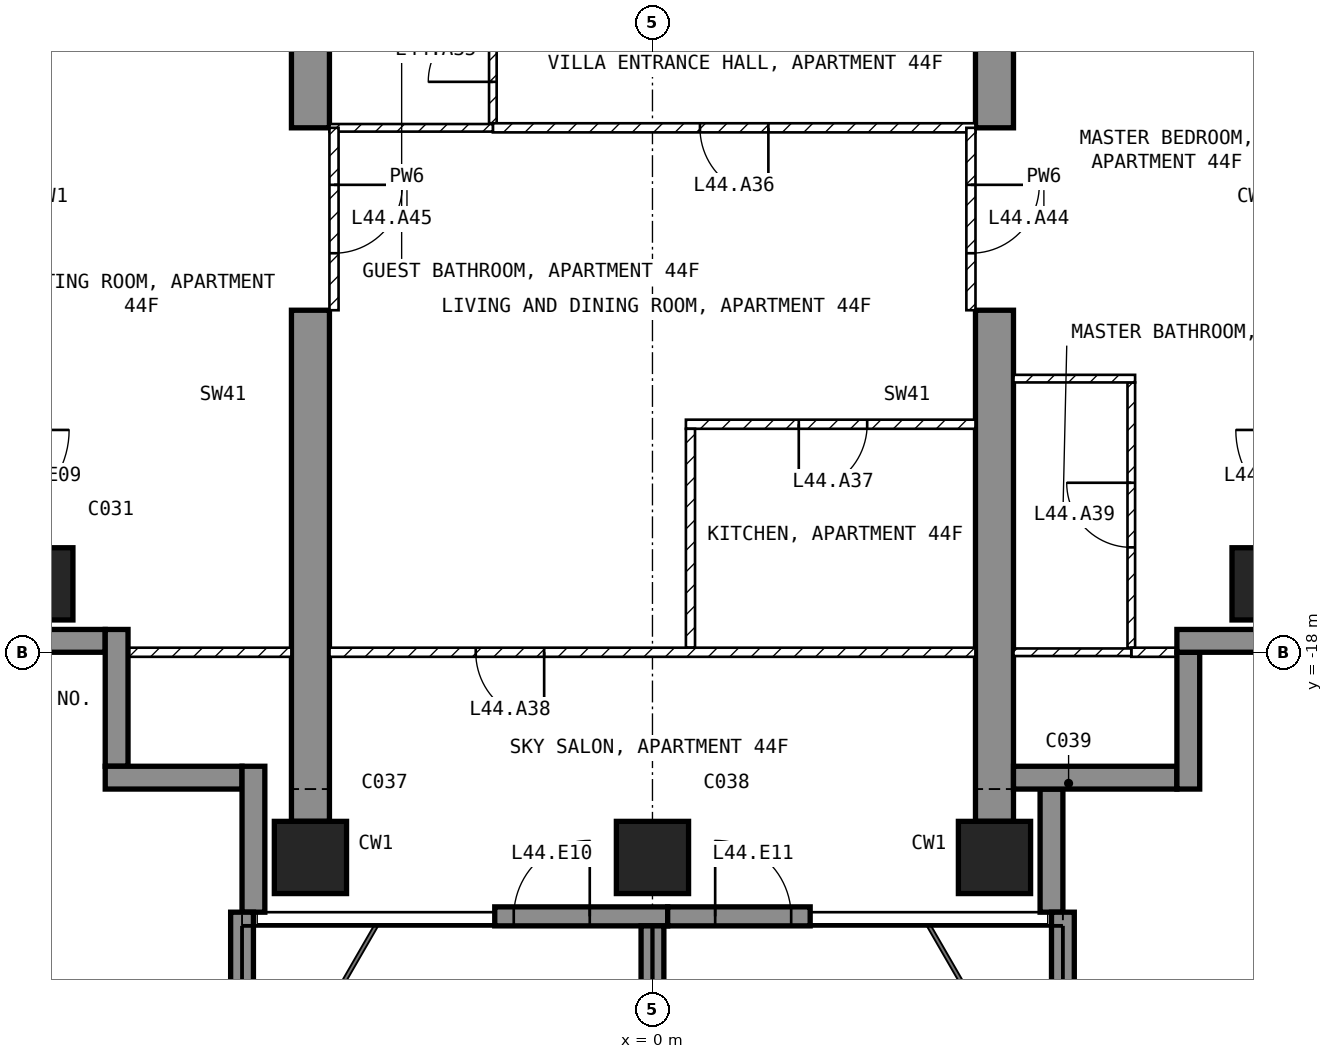
"""IFC4 building model, lengths in metres.
Left out: names, types, materials, properties, quantities, classifications, styles, units other than length and angle.
Written with IfcOpenShell. Run it as: python <this file> out.ifc"""

import sys

from ifc_helpers import new_model, si_unit, direction, frame, frame_2d, origin, origin_2d, place, context, subcontext, project, spatial, polyline, rectangle, outline, extrude, element, fill, save


model = new_model("IFC4")
c1 = context("Model", 3, precision=1e-05, world=origin(), true_north=direction((0.0, 1.0)))
c2 = subcontext(c1, "Body", "Model", "MODEL_VIEW")
j1 = project(units=[si_unit("LENGTHUNIT", "METRE"), si_unit("PLANEANGLEUNIT", "RADIAN")], contexts=[c1])
p1 = place(None, origin())
s1 = spatial("IfcSite", under=j1, at=p1, CompositionType="ELEMENT")
p2 = place(p1, origin())
s2 = spatial("IfcBuilding", under=s1, at=p2, CompositionType="ELEMENT")
p3 = place(p2, frame((0.0, 0.0, 180.6)))
s3 = spatial("IfcBuildingStorey", under=s2, at=p3, CompositionType="ELEMENT", Elevation=180.6)
for number, where, z_axis, x_axis in (
    (1, (-8.1, -17.1, -0.25), (0.0, 0.0, 1.0), (1.0, 0.0, 0.0)),
    (2, (-4.5, -20.7, -0.25), (0.0, 0.0, 1.0), (1.0, 0.0, 0.0)),
    (3, (0.0, -20.7, -0.25), (0.0, 0.0, 1.0), (1.0, 0.0, 0.0)),
    (4, (4.5, -20.7, -0.25), (0.0, 0.0, 1.0), (1.0, 0.0, 0.0)),
    (5, (8.1, -17.1, -0.25), (0.0, 0.0, 1.0), (1.0, 0.0, 0.0)),
):
    element("IfcColumn", number, at=place(p3, frame(where, z_axis=z_axis, x_axis=x_axis)), inside=s3, PredefinedType="COLUMN", context=c2, shape_type="SweptSolid", body=[
        extrude(rectangle(XDim=0.95, YDim=0.95, at=origin_2d()), origin(), (0.0, 0.0, 1.0), 3.5),
    ])
for number, where, z_axis, x_axis in (
    (6, (-4.75, -20.225, -0.25), (1.0, 0.0, 0.0), (0.0, 1.0, 0.0)),
    (7, (4.25, -20.225, -0.25), (1.0, 0.0, 0.0), (0.0, 1.0, 0.0)),
):
    element("IfcWall", number, at=place(p3, frame(where, z_axis=z_axis, x_axis=x_axis)), inside=s3, PredefinedType="SHEAR", context=c2, shape_type="SweptSolid", body=[
        extrude(outline(polyline([(0.0, 0.0), (6.725, 0.0), (6.725, 2.65), (9.125, 2.65), (9.125, 0.0), (11.225, 0.0), (11.225, 3.5), (0.0, 3.5), (0.0, 0.0)])), origin(), (0.0, 0.0, 1.0), 0.5),
    ])
p4 = place(p3, frame((-2.075, -21.475, 0.0), z_axis=(0.0, 0.0, 1.0), x_axis=(1.0, 0.0, 0.0)))
e8 = element("IfcWall", 8, at=p4, inside=s3, PredefinedType="SOLIDWALL", context=c2, shape_type="SweptSolid", body=[
    extrude(rectangle(XDim=2.275, YDim=0.25, at=frame_2d((1.137, 0.0))), origin(), (0.0, 0.0, 1.0), 3.25),
])
p5 = place(p4, frame((0.25, 0.0, 0.0)))
e9 = element("IfcOpeningElement", 9, at=p5, cuts=e8, PredefinedType="OPENING", context=c2, shape_type="SweptSolid", body=[
    extrude(rectangle(XDim=1.0, YDim=2.4, at=frame_2d((0.5, 1.2))), frame((0.0, 0.135, 0.0), z_axis=(0.0, -1.0, 0.0), x_axis=(1.0, 0.0, 0.0)), (0.0, 0.0, 1.0), 0.27),
])
p6 = place(p3, frame((0.2, -21.475, 0.0), z_axis=(0.0, 0.0, 1.0), x_axis=(1.0, 0.0, 0.0)))
e10 = element("IfcWall", 10, at=p6, inside=s3, PredefinedType="SOLIDWALL", context=c2, shape_type="SweptSolid", body=[
    extrude(rectangle(XDim=1.875, YDim=0.25, at=frame_2d((0.938, 0.0))), origin(), (0.0, 0.0, 1.0), 3.25),
])
p7 = place(p6, frame((0.625, 0.0, 0.0)))
e11 = element("IfcOpeningElement", 11, at=p7, cuts=e10, PredefinedType="OPENING", context=c2, shape_type="SweptSolid", body=[
    extrude(rectangle(XDim=1.0, YDim=2.4, at=frame_2d((0.5, 1.2))), frame((0.0, 0.135, 0.0), z_axis=(0.0, -1.0, 0.0), x_axis=(1.0, 0.0, 0.0)), (0.0, 0.0, 1.0), 0.27),
])
p8 = place(p3, frame((5.25, -21.42, 0.0), z_axis=(0.0, 0.0, 1.0), x_axis=(0.0, 1.0, 0.0)))
e12 = element("IfcWall", 12, at=p8, inside=s3, PredefinedType="SOLIDWALL", context=c2, shape_type="SweptSolid", body=[
    extrude(rectangle(XDim=1.62, YDim=0.3, at=frame_2d((0.81, 0.0))), origin(), (0.0, 0.0, 1.0), 3.25),
])
p9 = place(p3, frame((4.75, -19.65, 0.0), z_axis=(0.0, 0.0, 1.0), x_axis=(1.0, 0.0, 0.0)))
e13 = element("IfcWall", 13, at=p9, inside=s3, PredefinedType="SOLIDWALL", context=c2, shape_type="SweptSolid", body=[
    extrude(rectangle(XDim=2.15, YDim=0.3, at=frame_2d((1.075, 0.0))), origin(), (0.0, 0.0, 1.0), 3.25),
])
p10 = place(p3, frame((7.05, -19.8, 0.0), z_axis=(0.0, 0.0, 1.0), x_axis=(0.0, 1.0, 0.0)))
e14 = element("IfcWall", 14, at=p10, inside=s3, PredefinedType="SOLIDWALL", context=c2, shape_type="SweptSolid", body=[
    extrude(rectangle(XDim=1.8, YDim=0.3, at=frame_2d((0.9, 0.0))), origin(), (0.0, 0.0, 1.0), 3.25),
])
p11 = place(p3, frame((6.9, -17.85, 0.0), z_axis=(0.0, 0.0, 1.0), x_axis=(1.0, 0.0, 0.0)))
e15 = element("IfcWall", 15, at=p11, inside=s3, PredefinedType="SOLIDWALL", context=c2, shape_type="SweptSolid", body=[
    extrude(rectangle(XDim=1.85, YDim=0.3, at=frame_2d((0.925, 0.0))), origin(), (0.0, 0.0, 1.0), 3.25),
])
p12 = place(p3, frame((-8.75, -17.85, 0.0), z_axis=(0.0, 0.0, 1.0), x_axis=(1.0, 0.0, 0.0)))
e16 = element("IfcWall", 16, at=p12, inside=s3, PredefinedType="SOLIDWALL", context=c2, shape_type="SweptSolid", body=[
    extrude(rectangle(XDim=1.55, YDim=0.3, at=frame_2d((0.775, 0.0))), origin(), (0.0, 0.0, 1.0), 3.25),
])
for number, where, z_axis, x_axis in (
    (17, (-7.05, -17.7, 0.0), (0.0, 0.0, 1.0), (0.0, -1.0, 0.0)),
    (18, (-7.2, -19.65, 0.0), (0.0, 0.0, 1.0), (1.0, 0.0, 0.0)),
):
    element("IfcWall", number, at=place(p3, frame(where, z_axis=z_axis, x_axis=x_axis)), inside=s3, PredefinedType="SOLIDWALL", context=c2, shape_type="SweptSolid", body=[
        extrude(rectangle(XDim=1.8, YDim=0.3, at=frame_2d((0.9, 0.0))), origin(), (0.0, 0.0, 1.0), 3.25),
    ])
p13 = place(p3, frame((-5.25, -19.5, 0.0), z_axis=(0.0, 0.0, 1.0), x_axis=(0.0, -1.0, 0.0)))
e19 = element("IfcWall", 19, at=p13, inside=s3, PredefinedType="SOLIDWALL", context=c2, shape_type="SweptSolid", body=[
    extrude(rectangle(XDim=1.92, YDim=0.3, at=frame_2d((0.96, 0.0))), origin(), (0.0, 0.0, 1.0), 3.25),
])
p14 = place(p3, frame((-5.4, -21.42, 0.0), z_axis=(0.0, 0.0, 1.0), x_axis=(0.0, -1.0, 0.0)))
e20 = element("IfcWall", 20, at=p14, inside=s3, PredefinedType="SOLIDWALL", context=c2, shape_type="SweptSolid", body=[
    extrude(rectangle(XDim=2.88, YDim=0.3, at=frame_2d((1.44, 0.0))), origin(), (0.0, 0.0, 1.0), 3.25),
])
p15 = place(p3, frame((0.0, -21.6, 0.0), z_axis=(0.0, 0.0, 1.0), x_axis=(0.0, -1.0, 0.0)))
e21 = element("IfcWall", 21, at=p15, inside=s3, PredefinedType="SOLIDWALL", context=c2, shape_type="SweptSolid", body=[
    extrude(rectangle(XDim=2.7, YDim=0.3, at=frame_2d((1.35, 0.0))), origin(), (0.0, 0.0, 1.0), 3.25),
])
p16 = place(p3, frame((5.4, -21.42, 0.0), z_axis=(0.0, 0.0, 1.0), x_axis=(0.0, -1.0, 0.0)))
e22 = element("IfcWall", 22, at=p16, inside=s3, PredefinedType="SOLIDWALL", context=c2, shape_type="SweptSolid", body=[
    extrude(rectangle(XDim=2.88, YDim=0.3, at=frame_2d((1.44, 0.0))), origin(), (0.0, 0.0, 1.0), 3.25),
])
p17 = place(p3, frame((-2.1, -11.04, 0.0), z_axis=(0.0, 0.0, 1.0), x_axis=(0.0, 1.0, 0.0)))
e23 = element("IfcWall", 23, at=p17, inside=s3, PredefinedType="PARTITIONING", context=c2, shape_type="SweptSolid", body=[
    extrude(rectangle(XDim=1.94, YDim=0.1, at=frame_2d((0.97, 0.0))), origin(), (0.0, 0.0, 1.0), 3.25),
])
p18 = place(p17, frame((0.545, 0.0, 0.0)))
e24 = element("IfcOpeningElement", 24, at=p18, cuts=e23, PredefinedType="OPENING", context=c2, shape_type="SweptSolid", body=[
    extrude(rectangle(XDim=0.85, YDim=2.1, at=frame_2d((0.425, 1.05))), frame((0.0, 0.06, 0.0), z_axis=(0.0, -1.0, 0.0), x_axis=(1.0, 0.0, 0.0)), (0.0, 0.0, 1.0), 0.12),
])
p19 = place(p3, frame((4.25, -11.1, 0.0), z_axis=(0.0, 0.0, 1.0), x_axis=(-1.0, 0.0, 0.0)))
e25 = element("IfcWall", 25, at=p19, inside=s3, PredefinedType="PARTITIONING", context=c2, shape_type="SweptSolid", body=[
    extrude(rectangle(XDim=6.35, YDim=0.12, at=frame_2d((3.175, 0.0))), origin(), (0.0, 0.0, 1.0), 3.25),
])
p20 = place(p19, frame((2.725, 0.0, 0.0)))
e26 = element("IfcOpeningElement", 26, at=p20, cuts=e25, PredefinedType="OPENING", context=c2, shape_type="SweptSolid", body=[
    extrude(rectangle(XDim=0.9, YDim=2.1, at=frame_2d((0.45, 1.05))), frame((0.0, 0.07, 0.0), z_axis=(0.0, -1.0, 0.0), x_axis=(1.0, 0.0, 0.0)), (0.0, 0.0, 1.0), 0.14),
])
p21 = place(p3, frame((-2.1, -11.1, 0.0), z_axis=(0.0, 0.0, 1.0), x_axis=(-1.0, 0.0, 0.0)))
e27 = element("IfcWall", 27, at=p21, inside=s3, PredefinedType="PARTITIONING", context=c2, shape_type="SweptSolid", body=[
    extrude(rectangle(XDim=2.15, YDim=0.1, at=frame_2d((1.075, 0.0))), origin(), (0.0, 0.0, 1.0), 3.25),
])
p22 = place(p3, frame((4.25, -15.0, 0.0), z_axis=(0.0, 0.0, 1.0), x_axis=(-1.0, 0.0, 0.0)))
e28 = element("IfcWall", 28, at=p22, inside=s3, PredefinedType="PARTITIONING", context=c2, shape_type="SweptSolid", body=[
    extrude(rectangle(XDim=3.81, YDim=0.12, at=frame_2d((1.905, 0.0))), origin(), (0.0, 0.0, 1.0), 3.25),
])
p23 = place(p22, frame((1.425, 0.0, 0.0)))
e29 = element("IfcOpeningElement", 29, at=p23, cuts=e28, PredefinedType="OPENING", context=c2, shape_type="SweptSolid", body=[
    extrude(rectangle(XDim=0.9, YDim=2.1, at=frame_2d((0.45, 1.05))), frame((0.0, 0.07, 0.0), z_axis=(0.0, -1.0, 0.0), x_axis=(1.0, 0.0, 0.0)), (0.0, 0.0, 1.0), 0.14),
])
p24 = place(p3, frame((0.5, -15.06, 0.0), z_axis=(0.0, 0.0, 1.0), x_axis=(0.0, -1.0, 0.0)))
e30 = element("IfcWall", 30, at=p24, inside=s3, PredefinedType="PARTITIONING", context=c2, shape_type="SweptSolid", body=[
    extrude(rectangle(XDim=2.88, YDim=0.12, at=frame_2d((1.44, 0.0))), origin(), (0.0, 0.0, 1.0), 3.25),
])
p25 = place(p3, frame((4.25, -18.0, 0.0), z_axis=(0.0, 0.0, 1.0), x_axis=(-1.0, 0.0, 0.0)))
e31 = element("IfcWall", 31, at=p25, inside=s3, PredefinedType="PARTITIONING", context=c2, shape_type="SweptSolid", body=[
    extrude(rectangle(XDim=8.5, YDim=0.12, at=frame_2d((4.25, 0.0))), origin(), (0.0, 0.0, 1.0), 3.25),
])
p26 = place(p25, frame((5.675, 0.0, 0.0)))
e32 = element("IfcOpeningElement", 32, at=p26, cuts=e31, PredefinedType="OPENING", context=c2, shape_type="SweptSolid", body=[
    extrude(rectangle(XDim=0.9, YDim=2.1, at=frame_2d((0.45, 1.05))), frame((0.0, 0.07, 0.0), z_axis=(0.0, -1.0, 0.0), x_axis=(1.0, 0.0, 0.0)), (0.0, 0.0, 1.0), 0.14),
])
p27 = place(p3, frame((6.3, -17.94, 0.0), z_axis=(0.0, 0.0, 1.0), x_axis=(0.0, 1.0, 0.0)))
e33 = element("IfcWall", 33, at=p27, inside=s3, PredefinedType="PARTITIONING", context=c2, shape_type="SweptSolid", body=[
    extrude(rectangle(XDim=3.49, YDim=0.1, at=frame_2d((1.745, 0.0))), origin(), (0.0, 0.0, 1.0), 3.25),
])
p28 = place(p27, frame((1.32, 0.0, 0.0)))
e34 = element("IfcOpeningElement", 34, at=p28, cuts=e33, PredefinedType="OPENING", context=c2, shape_type="SweptSolid", body=[
    extrude(rectangle(XDim=0.85, YDim=2.1, at=frame_2d((0.425, 1.05))), frame((0.0, 0.06, 0.0), z_axis=(0.0, -1.0, 0.0), x_axis=(1.0, 0.0, 0.0)), (0.0, 0.0, 1.0), 0.12),
])
p29 = place(p3, frame((6.35, -14.4, 0.0), z_axis=(0.0, 0.0, 1.0), x_axis=(-1.0, 0.0, 0.0)))
e35 = element("IfcWall", 35, at=p29, inside=s3, PredefinedType="PARTITIONING", context=c2, shape_type="SweptSolid", body=[
    extrude(rectangle(XDim=1.6, YDim=0.1, at=frame_2d((0.8, 0.0))), origin(), (0.0, 0.0, 1.0), 3.25),
])
p30 = place(p3, frame((7.12, -18.0, 0.0), z_axis=(0.0, 0.0, 1.0), x_axis=(-1.0, 0.0, 0.0)))
e36 = element("IfcWall", 36, at=p30, inside=s3, PredefinedType="PARTITIONING", context=c2, shape_type="SweptSolid", body=[
    extrude(rectangle(XDim=0.82, YDim=0.12, at=frame_2d((0.41, 0.0))), origin(), (0.0, 0.0, 1.0), 3.25),
])
p31 = place(p3, frame((6.3, -18.0, 0.0), z_axis=(0.0, 0.0, 1.0), x_axis=(-1.0, 0.0, 0.0)))
e37 = element("IfcWall", 37, at=p31, inside=s3, PredefinedType="PARTITIONING", context=c2, shape_type="SweptSolid", body=[
    extrude(rectangle(XDim=1.55, YDim=0.1, at=frame_2d((0.775, 0.0))), origin(), (0.0, 0.0, 1.0), 3.25),
])
p32 = place(p3, frame((-4.75, -18.0, 0.0), z_axis=(0.0, 0.0, 1.0), x_axis=(-1.0, 0.0, 0.0)))
e38 = element("IfcWall", 38, at=p32, inside=s3, PredefinedType="PARTITIONING", context=c2, shape_type="SweptSolid", body=[
    extrude(rectangle(XDim=2.37, YDim=0.12, at=frame_2d((1.185, 0.0))), origin(), (0.0, 0.0, 1.0), 3.25),
])
p33 = place(p3, frame((4.19, -11.1, 0.0), z_axis=(0.0, 0.0, 1.0), x_axis=(0.0, -1.0, 0.0)))
e39 = element("IfcWall", 39, at=p33, inside=s3, PredefinedType="PARTITIONING", context=c2, shape_type="SweptSolid", body=[
    extrude(rectangle(XDim=2.4, YDim=0.12, at=frame_2d((1.2, 0.0))), origin(), (0.0, 0.0, 1.0), 2.4),
])
p34 = place(p33, frame((0.75, 0.0, 0.0)))
e40 = element("IfcOpeningElement", 40, at=p34, cuts=e39, PredefinedType="OPENING", context=c2, shape_type="SweptSolid", body=[
    extrude(rectangle(XDim=0.9, YDim=2.1, at=frame_2d((0.45, 1.05))), frame((0.0, 0.07, 0.0), z_axis=(0.0, -1.0, 0.0), x_axis=(1.0, 0.0, 0.0)), (0.0, 0.0, 1.0), 0.14),
])
p35 = place(p3, frame((-4.19, -11.1, 0.0), z_axis=(0.0, 0.0, 1.0), x_axis=(0.0, -1.0, 0.0)))
e41 = element("IfcWall", 41, at=p35, inside=s3, PredefinedType="PARTITIONING", context=c2, shape_type="SweptSolid", body=[
    extrude(rectangle(XDim=2.4, YDim=0.12, at=frame_2d((1.2, 0.0))), origin(), (0.0, 0.0, 1.0), 2.4),
])
p36 = place(p35, frame((0.75, 0.0, 0.0)))
e42 = element("IfcOpeningElement", 42, at=p36, cuts=e41, PredefinedType="OPENING", context=c2, shape_type="SweptSolid", body=[
    extrude(rectangle(XDim=0.9, YDim=2.1, at=frame_2d((0.45, 1.05))), frame((0.0, 0.07, 0.0), z_axis=(0.0, -1.0, 0.0), x_axis=(1.0, 0.0, 0.0)), (0.0, 0.0, 1.0), 0.14),
])
p37 = place(p5, origin())
e43 = element("IfcDoor", 43, at=p37, inside=s3, OperationType="SINGLE_SWING_RIGHT", PredefinedType="DOOR", context=c2, shape_type="SweptSolid", body=[
    extrude(rectangle(XDim=1.0, YDim=2.4, at=frame_2d((0.5, 1.2))), frame((0.0, 0.025, 0.0), z_axis=(0.0, -1.0, 0.0), x_axis=(1.0, 0.0, 0.0)), (0.0, 0.0, 1.0), 0.05),
])
fill(e9, e43)
p38 = place(p7, origin())
e44 = element("IfcDoor", 44, at=p38, inside=s3, OperationType="SINGLE_SWING_LEFT", PredefinedType="DOOR", context=c2, shape_type="SweptSolid", body=[
    extrude(rectangle(XDim=1.0, YDim=2.4, at=frame_2d((0.5, 1.2))), frame((0.0, 0.025, 0.0), z_axis=(0.0, -1.0, 0.0), x_axis=(1.0, 0.0, 0.0)), (0.0, 0.0, 1.0), 0.05),
])
fill(e11, e44)
p39 = place(p18, origin())
e45 = element("IfcDoor", 45, at=p39, inside=s3, OperationType="SINGLE_SWING_LEFT", PredefinedType="DOOR", context=c2, shape_type="SweptSolid", body=[
    extrude(rectangle(XDim=0.85, YDim=2.1, at=frame_2d((0.425, 1.05))), frame((0.0, 0.025, 0.0), z_axis=(0.0, -1.0, 0.0), x_axis=(1.0, 0.0, 0.0)), (0.0, 0.0, 1.0), 0.05),
])
fill(e24, e45)
p40 = place(p20, origin())
e46 = element("IfcDoor", 46, at=p40, inside=s3, OperationType="SINGLE_SWING_LEFT", PredefinedType="DOOR", context=c2, shape_type="SweptSolid", body=[
    extrude(rectangle(XDim=0.9, YDim=2.1, at=frame_2d((0.45, 1.05))), frame((0.0, 0.025, 0.0), z_axis=(0.0, -1.0, 0.0), x_axis=(1.0, 0.0, 0.0)), (0.0, 0.0, 1.0), 0.05),
])
fill(e26, e46)
p41 = place(p23, origin())
e47 = element("IfcDoor", 47, at=p41, inside=s3, OperationType="SINGLE_SWING_RIGHT", PredefinedType="DOOR", context=c2, shape_type="SweptSolid", body=[
    extrude(rectangle(XDim=0.9, YDim=2.1, at=frame_2d((0.45, 1.05))), frame((0.0, 0.025, 0.0), z_axis=(0.0, -1.0, 0.0), x_axis=(1.0, 0.0, 0.0)), (0.0, 0.0, 1.0), 0.05),
])
fill(e29, e47)
p42 = place(p26, origin())
e48 = element("IfcDoor", 48, at=p42, inside=s3, OperationType="SINGLE_SWING_LEFT", PredefinedType="DOOR", context=c2, shape_type="SweptSolid", body=[
    extrude(rectangle(XDim=0.9, YDim=2.1, at=frame_2d((0.45, 1.05))), frame((0.0, 0.025, 0.0), z_axis=(0.0, -1.0, 0.0), x_axis=(1.0, 0.0, 0.0)), (0.0, 0.0, 1.0), 0.05),
])
fill(e32, e48)
p43 = place(p28, origin())
e49 = element("IfcDoor", 49, at=p43, inside=s3, OperationType="SINGLE_SWING_RIGHT", PredefinedType="DOOR", context=c2, shape_type="SweptSolid", body=[
    extrude(rectangle(XDim=0.85, YDim=2.1, at=frame_2d((0.425, 1.05))), frame((0.0, 0.025, 0.0), z_axis=(0.0, -1.0, 0.0), x_axis=(1.0, 0.0, 0.0)), (0.0, 0.0, 1.0), 0.05),
])
fill(e34, e49)
p44 = place(p34, origin())
e50 = element("IfcDoor", 50, at=p44, inside=s3, OperationType="SINGLE_SWING_LEFT", PredefinedType="DOOR", context=c2, shape_type="SweptSolid", body=[
    extrude(rectangle(XDim=0.9, YDim=2.1, at=frame_2d((0.45, 1.05))), frame((0.0, 0.025, 0.0), z_axis=(0.0, -1.0, 0.0), x_axis=(1.0, 0.0, 0.0)), (0.0, 0.0, 1.0), 0.05),
])
fill(e40, e50)
p45 = place(p36, origin())
e51 = element("IfcDoor", 51, at=p45, inside=s3, OperationType="SINGLE_SWING_LEFT", PredefinedType="DOOR", context=c2, shape_type="SweptSolid", body=[
    extrude(rectangle(XDim=0.9, YDim=2.1, at=frame_2d((0.45, 1.05))), frame((0.0, 0.025, 0.0), z_axis=(0.0, -1.0, 0.0), x_axis=(1.0, 0.0, 0.0)), (0.0, 0.0, 1.0), 0.05),
])
fill(e42, e51)
save(model, sys.argv[1])
